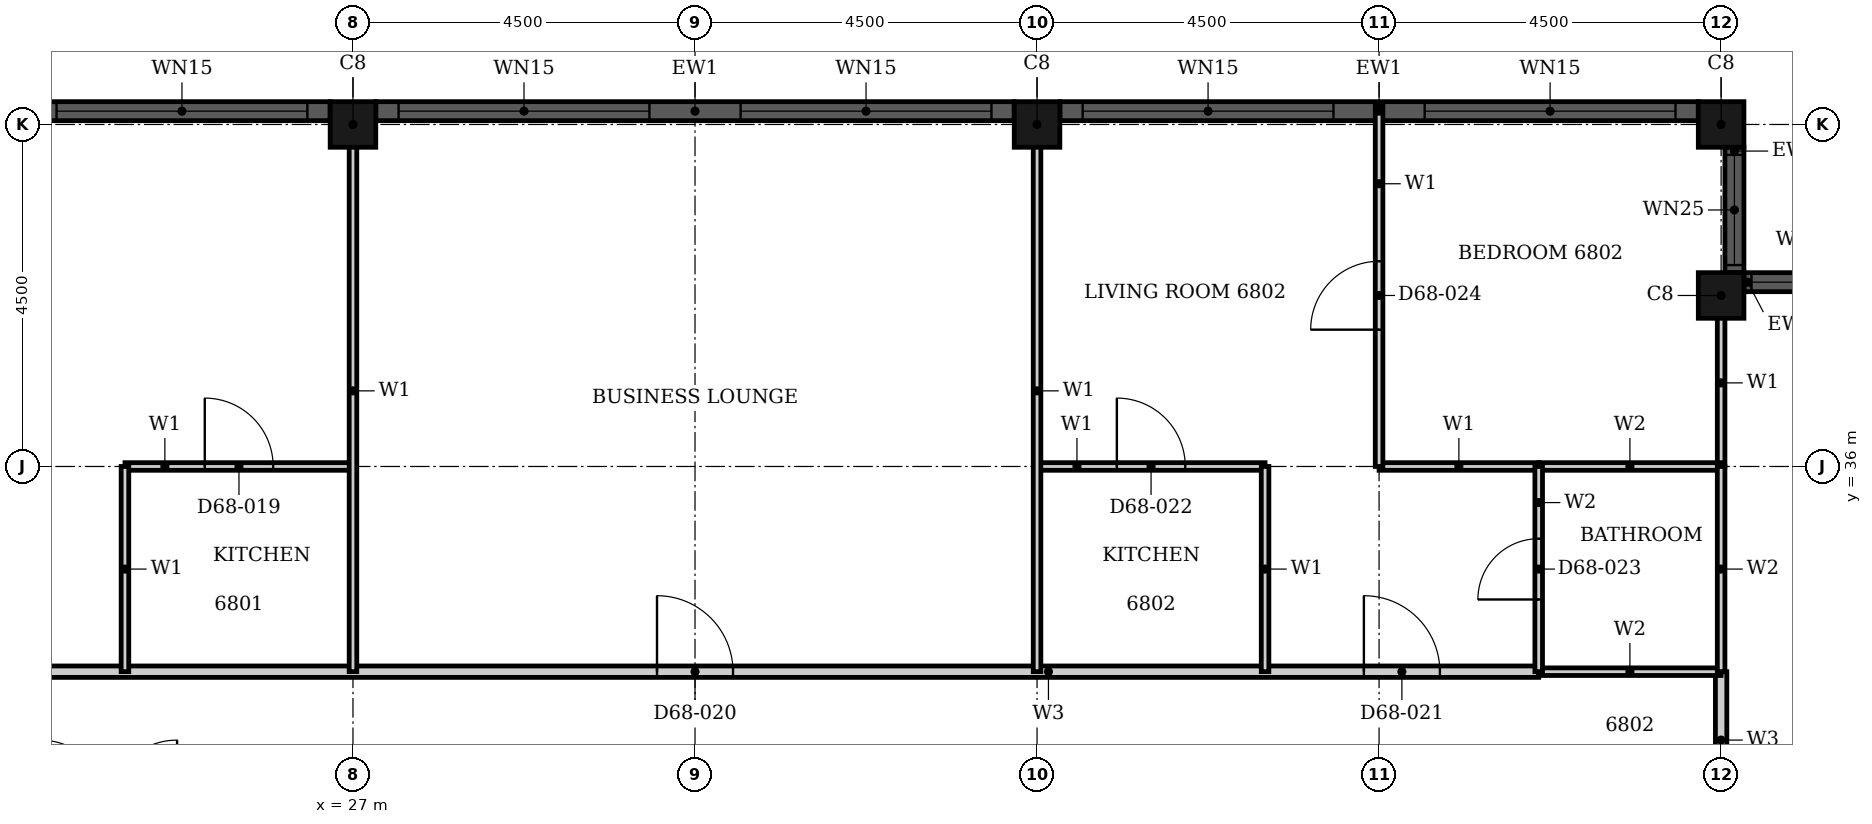
"""IFC4 building model, lengths in metres.
Left out: names, types, materials, properties, quantities, classifications, styles, units other than length and angle.
Written with IfcOpenShell. Run it as: python <this file> out.ifc"""

import sys

from ifc_helpers import new_model, si_unit, direction, frame, frame_2d, origin, origin_2d, place, context, subcontext, project, spatial, rectangle, hollow_rectangle, extrude, element, fill, save


model = new_model("IFC4")
c1 = context("Model", 3, precision=1e-05, world=origin(), true_north=direction((0.0, 1.0)))
c2 = subcontext(c1, "Body", "Model", "MODEL_VIEW")
j1 = project(units=[si_unit("LENGTHUNIT", "METRE"), si_unit("PLANEANGLEUNIT", "RADIAN")], contexts=[c1])
p1 = place(None, origin())
s1 = spatial("IfcSite", under=j1, at=p1, CompositionType="ELEMENT")
p2 = place(p1, origin())
s2 = spatial("IfcBuilding", under=s1, at=p2, CompositionType="ELEMENT")
p3 = place(p2, frame((0.0, 0.0, 267.5)))
s3 = spatial("IfcBuildingStorey", under=s2, at=p3, CompositionType="ELEMENT", Elevation=267.5)
for number, where, z_axis, x_axis in (
    (1, (45.0, 38.25, 0.0), (0.0, 0.0, 1.0), (1.0, 0.0, 0.0)),
    (2, (45.0, 40.5, 0.0), (0.0, 0.0, 1.0), (1.0, 0.0, 0.0)),
    (3, (36.0, 40.5, 0.0), (0.0, 0.0, 1.0), (1.0, 0.0, 0.0)),
    (4, (27.0, 40.5, 0.0), (0.0, 0.0, 1.0), (1.0, 0.0, 0.0)),
):
    element("IfcColumn", number, at=place(p3, frame(where, z_axis=z_axis, x_axis=x_axis)), inside=s3, PredefinedType="COLUMN", context=c2, shape_type="SweptSolid", body=[
        extrude(hollow_rectangle(XDim=0.6, YDim=0.6, WallThickness=0.02, at=origin_2d()), origin(), (0.0, 0.0, 1.0), 3.7),
    ])
p4 = place(p3, frame((46.95, 38.425, 0.0), z_axis=(0.0, 0.0, 1.0), x_axis=(-1.0, 0.0, 0.0)))
e5 = element("IfcWall", 5, at=p4, inside=s3, PredefinedType="SOLIDWALL", context=c2, shape_type="SweptSolid", body=[
    extrude(rectangle(XDim=1.65, YDim=0.25, at=frame_2d((0.825, 0.0))), origin(), (0.0, 0.0, 1.0), 3.7),
])
p5 = place(p4, frame((0.1, 0.0, 0.9)))
e6 = element("IfcOpeningElement", 6, at=p5, cuts=e5, PredefinedType="OPENING", context=c2, shape_type="SweptSolid", body=[
    extrude(rectangle(XDim=1.45, YDim=1.85, at=frame_2d((0.725, 0.925))), frame((0.0, 0.135, 0.0), z_axis=(0.0, -1.0, 0.0), x_axis=(1.0, 0.0, 0.0)), (0.0, 0.0, 1.0), 0.27),
])
p6 = place(p3, frame((45.175, 38.55, 0.0), z_axis=(0.0, 0.0, 1.0), x_axis=(0.0, 1.0, 0.0)))
e7 = element("IfcWall", 7, at=p6, inside=s3, PredefinedType="SOLIDWALL", context=c2, shape_type="SweptSolid", body=[
    extrude(rectangle(XDim=1.65, YDim=0.25, at=frame_2d((0.825, 0.0))), origin(), (0.0, 0.0, 1.0), 3.7),
])
p7 = place(p6, frame((0.1, 0.0, 0.9)))
e8 = element("IfcOpeningElement", 8, at=p7, cuts=e7, PredefinedType="OPENING", context=c2, shape_type="SweptSolid", body=[
    extrude(rectangle(XDim=1.45, YDim=1.85, at=frame_2d((0.725, 0.925))), frame((0.0, 0.135, 0.0), z_axis=(0.0, -1.0, 0.0), x_axis=(1.0, 0.0, 0.0)), (0.0, 0.0, 1.0), 0.27),
])
p8 = place(p3, frame((44.7, 40.675, 0.0), z_axis=(0.0, 0.0, 1.0), x_axis=(-1.0, 0.0, 0.0)))
e9 = element("IfcWall", 9, at=p8, inside=s3, PredefinedType="SOLIDWALL", context=c2, shape_type="SweptSolid", body=[
    extrude(rectangle(XDim=8.4, YDim=0.25, at=frame_2d((4.2, 0.0))), origin(), (0.0, 0.0, 1.0), 3.7),
])
p9 = place(p8, frame((0.3, 0.0, 0.45)))
e10 = element("IfcOpeningElement", 10, at=p9, cuts=e9, PredefinedType="OPENING", context=c2, shape_type="SweptSolid", body=[
    extrude(rectangle(XDim=3.3, YDim=2.3, at=frame_2d((1.65, 1.15))), frame((0.0, 0.135, 0.0), z_axis=(0.0, -1.0, 0.0), x_axis=(1.0, 0.0, 0.0)), (0.0, 0.0, 1.0), 0.27),
])
p10 = place(p8, frame((4.8, 0.0, 0.45)))
e11 = element("IfcOpeningElement", 11, at=p10, cuts=e9, PredefinedType="OPENING", context=c2, shape_type="SweptSolid", body=[
    extrude(rectangle(XDim=3.3, YDim=2.3, at=frame_2d((1.65, 1.15))), frame((0.0, 0.135, 0.0), z_axis=(0.0, -1.0, 0.0), x_axis=(1.0, 0.0, 0.0)), (0.0, 0.0, 1.0), 0.27),
])
p11 = place(p3, frame((35.7, 40.675, 0.0), z_axis=(0.0, 0.0, 1.0), x_axis=(-1.0, 0.0, 0.0)))
e12 = element("IfcWall", 12, at=p11, inside=s3, PredefinedType="SOLIDWALL", context=c2, shape_type="SweptSolid", body=[
    extrude(rectangle(XDim=8.4, YDim=0.25, at=frame_2d((4.2, 0.0))), origin(), (0.0, 0.0, 1.0), 3.7),
])
p12 = place(p11, frame((0.3, 0.0, 0.45)))
e13 = element("IfcOpeningElement", 13, at=p12, cuts=e12, PredefinedType="OPENING", context=c2, shape_type="SweptSolid", body=[
    extrude(rectangle(XDim=3.3, YDim=2.3, at=frame_2d((1.65, 1.15))), frame((0.0, 0.135, 0.0), z_axis=(0.0, -1.0, 0.0), x_axis=(1.0, 0.0, 0.0)), (0.0, 0.0, 1.0), 0.27),
])
p13 = place(p11, frame((4.8, 0.0, 0.45)))
e14 = element("IfcOpeningElement", 14, at=p13, cuts=e12, PredefinedType="OPENING", context=c2, shape_type="SweptSolid", body=[
    extrude(rectangle(XDim=3.3, YDim=2.3, at=frame_2d((1.65, 1.15))), frame((0.0, 0.135, 0.0), z_axis=(0.0, -1.0, 0.0), x_axis=(1.0, 0.0, 0.0)), (0.0, 0.0, 1.0), 0.27),
])
p14 = place(p3, frame((26.7, 40.675, 0.0), z_axis=(0.0, 0.0, 1.0), x_axis=(-1.0, 0.0, 0.0)))
e15 = element("IfcWall", 15, at=p14, inside=s3, PredefinedType="SOLIDWALL", context=c2, shape_type="SweptSolid", body=[
    extrude(rectangle(XDim=8.4, YDim=0.25, at=frame_2d((4.2, 0.0))), origin(), (0.0, 0.0, 1.0), 3.7),
])
p15 = place(p14, frame((0.3, 0.0, 0.45)))
e16 = element("IfcOpeningElement", 16, at=p15, cuts=e15, PredefinedType="OPENING", context=c2, shape_type="SweptSolid", body=[
    extrude(rectangle(XDim=3.3, YDim=2.3, at=frame_2d((1.65, 1.15))), frame((0.0, 0.135, 0.0), z_axis=(0.0, -1.0, 0.0), x_axis=(1.0, 0.0, 0.0)), (0.0, 0.0, 1.0), 0.27),
])
p16 = place(p14, frame((4.8, 0.0, 0.45)))
e17 = element("IfcOpeningElement", 17, at=p16, cuts=e15, PredefinedType="OPENING", context=c2, shape_type="SweptSolid", body=[
    extrude(rectangle(XDim=3.3, YDim=2.3, at=frame_2d((1.65, 1.15))), frame((0.0, 0.135, 0.0), z_axis=(0.0, -1.0, 0.0), x_axis=(1.0, 0.0, 0.0)), (0.0, 0.0, 1.0), 0.27),
])
p17 = place(p3, frame((20.4, 33.3, 0.0), z_axis=(0.0, 0.0, 1.0), x_axis=(1.0, 0.0, 0.0)))
e18 = element("IfcWall", 18, at=p17, inside=s3, PredefinedType="PARTITIONING", context=c2, shape_type="SweptSolid", body=[
    extrude(rectangle(XDim=22.2, YDim=0.15, at=frame_2d((11.1, 0.0))), origin(), (0.0, 0.0, 1.0), 3.4),
])
p18 = place(p17, frame((1.3, 0.0, 0.0)))
e19 = element("IfcOpeningElement", 19, at=p18, cuts=e18, PredefinedType="OPENING", context=c2, shape_type="SweptSolid", body=[
    extrude(rectangle(XDim=1.0, YDim=2.2, at=frame_2d((0.5, 1.1))), frame((0.0, 0.085, 0.0), z_axis=(0.0, -1.0, 0.0), x_axis=(1.0, 0.0, 0.0)), (0.0, 0.0, 1.0), 0.17),
])
p19 = place(p17, frame((10.6, 0.0, 0.0)))
e20 = element("IfcOpeningElement", 20, at=p19, cuts=e18, PredefinedType="OPENING", context=c2, shape_type="SweptSolid", body=[
    extrude(rectangle(XDim=1.0, YDim=2.1, at=frame_2d((0.5, 1.05))), frame((0.0, 0.085, 0.0), z_axis=(0.0, -1.0, 0.0), x_axis=(1.0, 0.0, 0.0)), (0.0, 0.0, 1.0), 0.17),
])
p20 = place(p17, frame((19.9, 0.0, 0.0)))
e21 = element("IfcOpeningElement", 21, at=p20, cuts=e18, PredefinedType="OPENING", context=c2, shape_type="SweptSolid", body=[
    extrude(rectangle(XDim=1.0, YDim=2.2, at=frame_2d((0.5, 1.1))), frame((0.0, 0.085, 0.0), z_axis=(0.0, -1.0, 0.0), x_axis=(1.0, 0.0, 0.0)), (0.0, 0.0, 1.0), 0.17),
])
p21 = place(p3, frame((45.0, 31.5, 0.0), z_axis=(0.0, 0.0, 1.0), x_axis=(0.0, 1.0, 0.0)))
e22 = element("IfcWall", 22, at=p21, inside=s3, PredefinedType="PARTITIONING", context=c2, shape_type="SweptSolid", body=[
    extrude(rectangle(XDim=1.8, YDim=0.15, at=frame_2d((0.9, 0.0))), origin(), (0.0, 0.0, 1.0), 3.4),
])
p22 = place(p3, frame((24.0, 36.0, 0.0), z_axis=(0.0, 0.0, 1.0), x_axis=(1.0, 0.0, 0.0)))
e23 = element("IfcWall", 23, at=p22, inside=s3, PredefinedType="PARTITIONING", context=c2, shape_type="SweptSolid", body=[
    extrude(rectangle(XDim=3.0, YDim=0.1, at=frame_2d((1.5, 0.0))), origin(), (0.0, 0.0, 1.0), 3.4),
])
p23 = place(p22, frame((1.05, 0.0, 0.0)))
e24 = element("IfcOpeningElement", 24, at=p23, cuts=e23, PredefinedType="OPENING", context=c2, shape_type="SweptSolid", body=[
    extrude(rectangle(XDim=0.9, YDim=2.1, at=frame_2d((0.45, 1.05))), frame((0.0, 0.06, 0.0), z_axis=(0.0, -1.0, 0.0), x_axis=(1.0, 0.0, 0.0)), (0.0, 0.0, 1.0), 0.12),
])
p24 = place(p3, frame((40.5, 36.0, 0.0), z_axis=(0.0, 0.0, 1.0), x_axis=(1.0, 0.0, 0.0)))
e25 = element("IfcWall", 25, at=p24, inside=s3, PredefinedType="PARTITIONING", context=c2, shape_type="SweptSolid", body=[
    extrude(rectangle(XDim=2.1, YDim=0.1, at=frame_2d((1.05, 0.0))), origin(), (0.0, 0.0, 1.0), 3.4),
])
p25 = place(p3, frame((36.0, 36.0, 0.0), z_axis=(0.0, 0.0, 1.0), x_axis=(1.0, 0.0, 0.0)))
e26 = element("IfcWall", 26, at=p25, inside=s3, PredefinedType="PARTITIONING", context=c2, shape_type="SweptSolid", body=[
    extrude(rectangle(XDim=3.0, YDim=0.1, at=frame_2d((1.5, 0.0))), origin(), (0.0, 0.0, 1.0), 3.4),
])
p26 = place(p25, frame((1.05, 0.0, 0.0)))
e27 = element("IfcOpeningElement", 27, at=p26, cuts=e26, PredefinedType="OPENING", context=c2, shape_type="SweptSolid", body=[
    extrude(rectangle(XDim=0.9, YDim=2.1, at=frame_2d((0.45, 1.05))), frame((0.0, 0.06, 0.0), z_axis=(0.0, -1.0, 0.0), x_axis=(1.0, 0.0, 0.0)), (0.0, 0.0, 1.0), 0.12),
])
p27 = place(p3, frame((24.0, 33.3, 0.0), z_axis=(0.0, 0.0, 1.0), x_axis=(0.0, 1.0, 0.0)))
e28 = element("IfcWall", 28, at=p27, inside=s3, PredefinedType="PARTITIONING", context=c2, shape_type="SweptSolid", body=[
    extrude(rectangle(XDim=2.7, YDim=0.1, at=frame_2d((1.35, 0.0))), origin(), (0.0, 0.0, 1.0), 3.4),
])
for number, where, z_axis, x_axis in (
    (29, (27.0, 33.3, 0.0), (0.0, 0.0, 1.0), (0.0, 1.0, 0.0)),
    (30, (36.0, 33.3, 0.0), (0.0, 0.0, 1.0), (0.0, 1.0, 0.0)),
):
    element("IfcWall", number, at=place(p3, frame(where, z_axis=z_axis, x_axis=x_axis)), inside=s3, PredefinedType="PARTITIONING", context=c2, shape_type="SweptSolid", body=[
        extrude(rectangle(XDim=7.39, YDim=0.1, at=frame_2d((3.695, 0.0))), origin(), (0.0, 0.0, 1.0), 3.4),
    ])
p28 = place(p3, frame((39.0, 33.3, 0.0), z_axis=(0.0, 0.0, 1.0), x_axis=(0.0, 1.0, 0.0)))
e31 = element("IfcWall", 31, at=p28, inside=s3, PredefinedType="PARTITIONING", context=c2, shape_type="SweptSolid", body=[
    extrude(rectangle(XDim=2.7, YDim=0.1, at=frame_2d((1.35, 0.0))), origin(), (0.0, 0.0, 1.0), 3.4),
])
p29 = place(p3, frame((40.5, 36.0, 0.0), z_axis=(0.0, 0.0, 1.0), x_axis=(0.0, 1.0, 0.0)))
e32 = element("IfcWall", 32, at=p29, inside=s3, PredefinedType="PARTITIONING", context=c2, shape_type="SweptSolid", body=[
    extrude(rectangle(XDim=4.74, YDim=0.1, at=frame_2d((2.37, 0.0))), origin(), (0.0, 0.0, 1.0), 3.4),
])
p30 = place(p29, frame((1.8, 0.0, 0.0)))
e33 = element("IfcOpeningElement", 33, at=p30, cuts=e32, PredefinedType="OPENING", context=c2, shape_type="SweptSolid", body=[
    extrude(rectangle(XDim=0.9, YDim=2.1, at=frame_2d((0.45, 1.05))), frame((0.0, 0.06, 0.0), z_axis=(0.0, -1.0, 0.0), x_axis=(1.0, 0.0, 0.0)), (0.0, 0.0, 1.0), 0.12),
])
p31 = place(p3, frame((45.0, 36.0, 0.0), z_axis=(0.0, 0.0, 1.0), x_axis=(0.0, 1.0, 0.0)))
e34 = element("IfcWall", 34, at=p31, inside=s3, PredefinedType="PARTITIONING", context=c2, shape_type="SweptSolid", body=[
    extrude(rectangle(XDim=2.2, YDim=0.1, at=frame_2d((1.1, 0.0))), origin(), (0.0, 0.0, 1.0), 3.4),
])
for number, where, z_axis, x_axis in (
    (35, (42.6, 33.3, 0.0), (0.0, 0.0, 1.0), (1.0, 0.0, 0.0)),
    (36, (42.6, 36.0, 0.0), (0.0, 0.0, 1.0), (1.0, 0.0, 0.0)),
):
    element("IfcWall", number, at=place(p3, frame(where, z_axis=z_axis, x_axis=x_axis)), inside=s3, PredefinedType="PARTITIONING", context=c2, shape_type="SweptSolid", body=[
        extrude(rectangle(XDim=2.4, YDim=0.1, at=frame_2d((1.2, 0.0))), origin(), (0.0, 0.0, 1.0), 3.4),
    ])
p32 = place(p3, frame((42.6, 33.3, 0.0), z_axis=(0.0, 0.0, 1.0), x_axis=(0.0, 1.0, 0.0)))
e37 = element("IfcWall", 37, at=p32, inside=s3, PredefinedType="PARTITIONING", context=c2, shape_type="SweptSolid", body=[
    extrude(rectangle(XDim=2.7, YDim=0.1, at=frame_2d((1.35, 0.0))), origin(), (0.0, 0.0, 1.0), 3.4),
])
p33 = place(p32, frame((0.95, 0.0, 0.0)))
e38 = element("IfcOpeningElement", 38, at=p33, cuts=e37, PredefinedType="OPENING", context=c2, shape_type="SweptSolid", body=[
    extrude(rectangle(XDim=0.8, YDim=2.1, at=frame_2d((0.4, 1.05))), frame((0.0, 0.06, 0.0), z_axis=(0.0, -1.0, 0.0), x_axis=(1.0, 0.0, 0.0)), (0.0, 0.0, 1.0), 0.12),
])
p34 = place(p3, frame((45.0, 33.3, 0.0), z_axis=(0.0, 0.0, 1.0), x_axis=(0.0, 1.0, 0.0)))
e39 = element("IfcWall", 39, at=p34, inside=s3, PredefinedType="PARTITIONING", context=c2, shape_type="SweptSolid", body=[
    extrude(rectangle(XDim=2.7, YDim=0.1, at=frame_2d((1.35, 0.0))), origin(), (0.0, 0.0, 1.0), 3.4),
])
p35 = place(p5, origin())
e40 = element("IfcWindow", 40, at=p35, inside=s3, PartitioningType="SINGLE_PANEL", PredefinedType="WINDOW", context=c2, shape_type="SweptSolid", body=[
    extrude(rectangle(XDim=1.45, YDim=1.85, at=frame_2d((0.725, 0.925))), frame((0.0, 0.03, 0.0), z_axis=(0.0, -1.0, 0.0), x_axis=(1.0, 0.0, 0.0)), (0.0, 0.0, 1.0), 0.06),
])
fill(e6, e40)
p36 = place(p7, origin())
e41 = element("IfcWindow", 41, at=p36, inside=s3, PartitioningType="SINGLE_PANEL", PredefinedType="WINDOW", context=c2, shape_type="SweptSolid", body=[
    extrude(rectangle(XDim=1.45, YDim=1.85, at=frame_2d((0.725, 0.925))), frame((0.0, 0.03, 0.0), z_axis=(0.0, -1.0, 0.0), x_axis=(1.0, 0.0, 0.0)), (0.0, 0.0, 1.0), 0.06),
])
fill(e8, e41)
p37 = place(p9, origin())
e42 = element("IfcWindow", 42, at=p37, inside=s3, PartitioningType="SINGLE_PANEL", PredefinedType="WINDOW", context=c2, shape_type="SweptSolid", body=[
    extrude(rectangle(XDim=3.3, YDim=2.3, at=frame_2d((1.65, 1.15))), frame((0.0, 0.03, 0.0), z_axis=(0.0, -1.0, 0.0), x_axis=(1.0, 0.0, 0.0)), (0.0, 0.0, 1.0), 0.06),
])
fill(e10, e42)
p38 = place(p10, origin())
e43 = element("IfcWindow", 43, at=p38, inside=s3, PartitioningType="SINGLE_PANEL", PredefinedType="WINDOW", context=c2, shape_type="SweptSolid", body=[
    extrude(rectangle(XDim=3.3, YDim=2.3, at=frame_2d((1.65, 1.15))), frame((0.0, 0.03, 0.0), z_axis=(0.0, -1.0, 0.0), x_axis=(1.0, 0.0, 0.0)), (0.0, 0.0, 1.0), 0.06),
])
fill(e11, e43)
p39 = place(p12, origin())
e44 = element("IfcWindow", 44, at=p39, inside=s3, PartitioningType="SINGLE_PANEL", PredefinedType="WINDOW", context=c2, shape_type="SweptSolid", body=[
    extrude(rectangle(XDim=3.3, YDim=2.3, at=frame_2d((1.65, 1.15))), frame((0.0, 0.03, 0.0), z_axis=(0.0, -1.0, 0.0), x_axis=(1.0, 0.0, 0.0)), (0.0, 0.0, 1.0), 0.06),
])
fill(e13, e44)
p40 = place(p13, origin())
e45 = element("IfcWindow", 45, at=p40, inside=s3, PartitioningType="SINGLE_PANEL", PredefinedType="WINDOW", context=c2, shape_type="SweptSolid", body=[
    extrude(rectangle(XDim=3.3, YDim=2.3, at=frame_2d((1.65, 1.15))), frame((0.0, 0.03, 0.0), z_axis=(0.0, -1.0, 0.0), x_axis=(1.0, 0.0, 0.0)), (0.0, 0.0, 1.0), 0.06),
])
fill(e14, e45)
p41 = place(p15, origin())
e46 = element("IfcWindow", 46, at=p41, inside=s3, PartitioningType="SINGLE_PANEL", PredefinedType="WINDOW", context=c2, shape_type="SweptSolid", body=[
    extrude(rectangle(XDim=3.3, YDim=2.3, at=frame_2d((1.65, 1.15))), frame((0.0, 0.03, 0.0), z_axis=(0.0, -1.0, 0.0), x_axis=(1.0, 0.0, 0.0)), (0.0, 0.0, 1.0), 0.06),
])
fill(e16, e46)
p42 = place(p23, origin())
e47 = element("IfcDoor", 47, at=p42, inside=s3, OperationType="SINGLE_SWING_RIGHT", PredefinedType="DOOR", context=c2, shape_type="SweptSolid", body=[
    extrude(rectangle(XDim=0.9, YDim=2.1, at=frame_2d((0.45, 1.05))), frame((0.0, 0.025, 0.0), z_axis=(0.0, -1.0, 0.0), x_axis=(1.0, 0.0, 0.0)), (0.0, 0.0, 1.0), 0.05),
])
fill(e24, e47)
p43 = place(p19, origin())
e48 = element("IfcDoor", 48, at=p43, inside=s3, OperationType="SINGLE_SWING_LEFT", PredefinedType="DOOR", context=c2, shape_type="SweptSolid", body=[
    extrude(rectangle(XDim=1.0, YDim=2.1, at=frame_2d((0.5, 1.05))), frame((0.0, 0.025, 0.0), z_axis=(0.0, -1.0, 0.0), x_axis=(1.0, 0.0, 0.0)), (0.0, 0.0, 1.0), 0.05),
])
fill(e20, e48)
p44 = place(p20, origin())
e49 = element("IfcDoor", 49, at=p44, inside=s3, OperationType="SINGLE_SWING_RIGHT", PredefinedType="DOOR", context=c2, shape_type="SweptSolid", body=[
    extrude(rectangle(XDim=1.0, YDim=2.2, at=frame_2d((0.5, 1.1))), frame((0.0, 0.025, 0.0), z_axis=(0.0, -1.0, 0.0), x_axis=(1.0, 0.0, 0.0)), (0.0, 0.0, 1.0), 0.05),
])
fill(e21, e49)
p45 = place(p26, origin())
e50 = element("IfcDoor", 50, at=p45, inside=s3, OperationType="SINGLE_SWING_LEFT", PredefinedType="DOOR", context=c2, shape_type="SweptSolid", body=[
    extrude(rectangle(XDim=0.9, YDim=2.1, at=frame_2d((0.45, 1.05))), frame((0.0, 0.025, 0.0), z_axis=(0.0, -1.0, 0.0), x_axis=(1.0, 0.0, 0.0)), (0.0, 0.0, 1.0), 0.05),
])
fill(e27, e50)
p46 = place(p33, origin())
e51 = element("IfcDoor", 51, at=p46, inside=s3, OperationType="SINGLE_SWING_LEFT", PredefinedType="DOOR", context=c2, shape_type="SweptSolid", body=[
    extrude(rectangle(XDim=0.8, YDim=2.1, at=frame_2d((0.4, 1.05))), frame((0.0, 0.025, 0.0), z_axis=(0.0, -1.0, 0.0), x_axis=(1.0, 0.0, 0.0)), (0.0, 0.0, 1.0), 0.05),
])
fill(e38, e51)
p47 = place(p30, origin())
e52 = element("IfcDoor", 52, at=p47, inside=s3, OperationType="SINGLE_SWING_LEFT", PredefinedType="DOOR", context=c2, shape_type="SweptSolid", body=[
    extrude(rectangle(XDim=0.9, YDim=2.1, at=frame_2d((0.45, 1.05))), frame((0.0, 0.025, 0.0), z_axis=(0.0, -1.0, 0.0), x_axis=(1.0, 0.0, 0.0)), (0.0, 0.0, 1.0), 0.05),
])
fill(e33, e52)
save(model, sys.argv[1])
